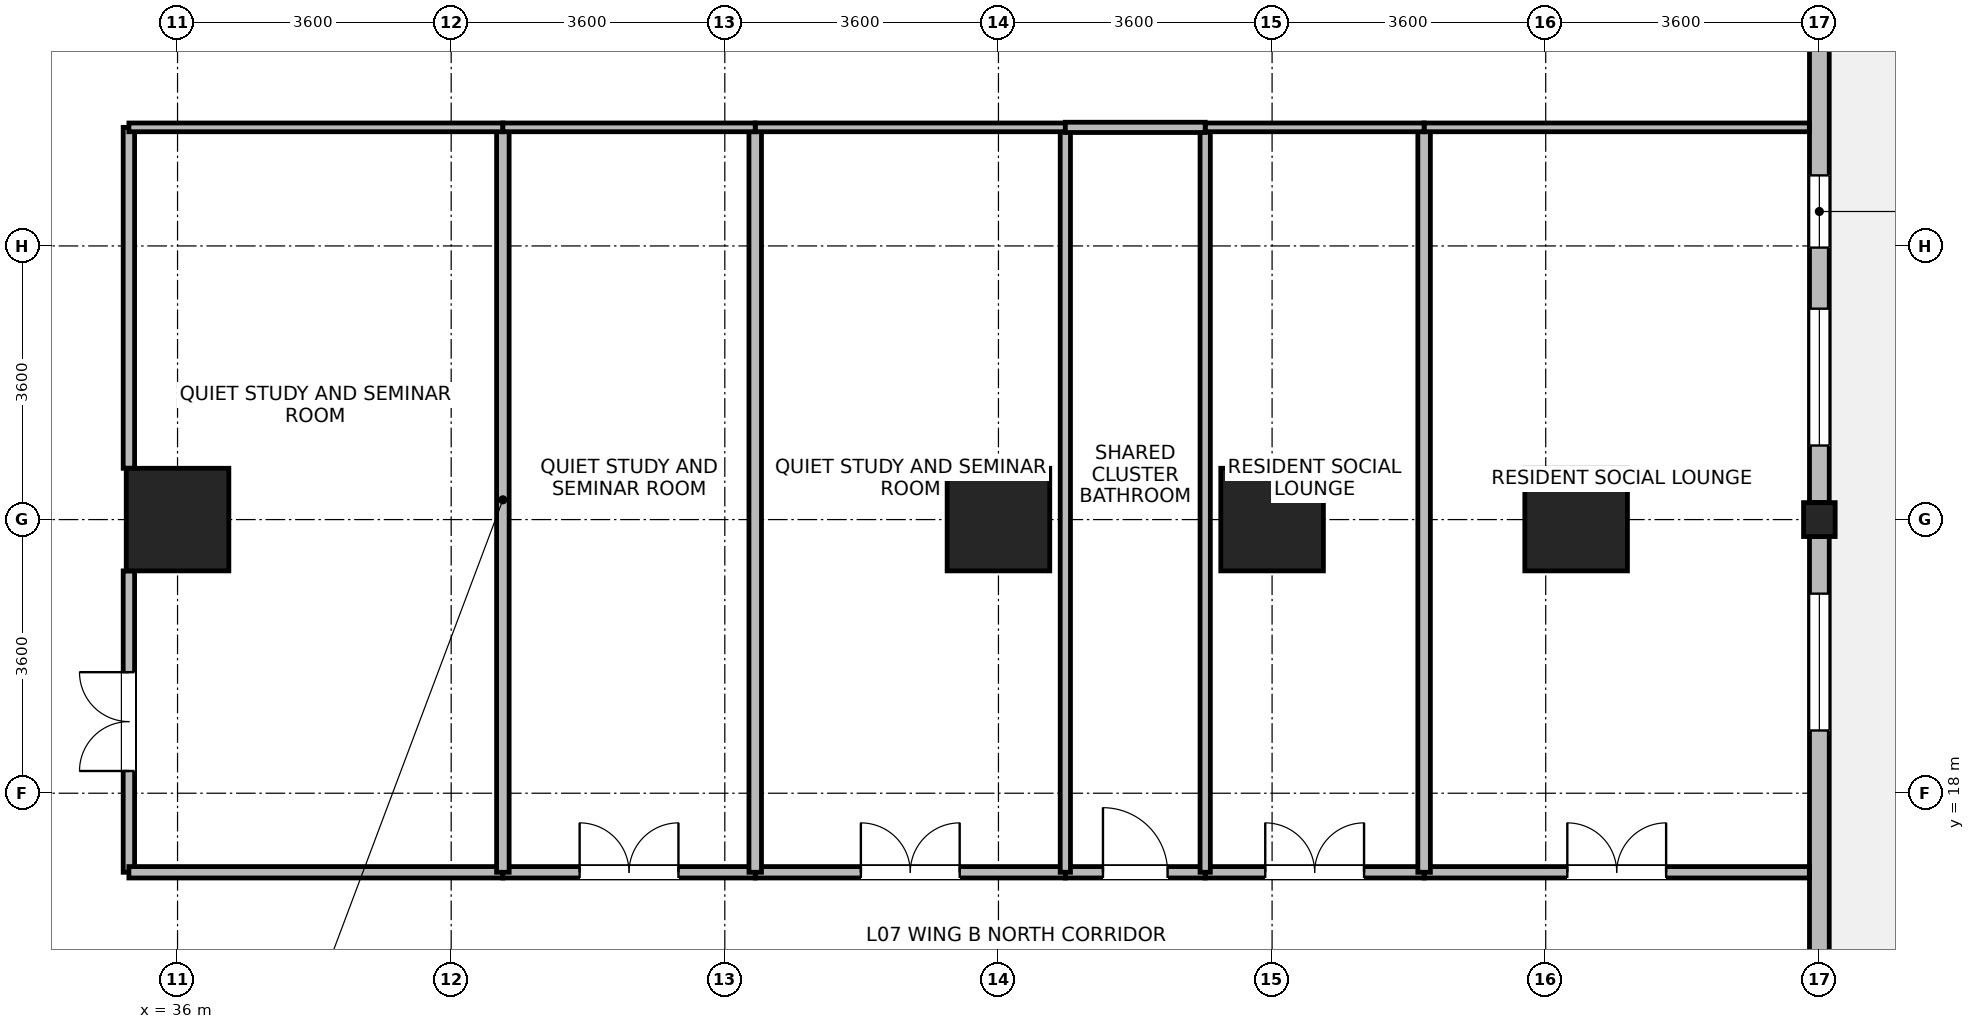
"""IFC4 building model, lengths in metres.
Left out: names, types, materials, properties, quantities, classifications, styles, units other than length and angle.
Written with IfcOpenShell. Run it as: python <this file> out.ifc"""

import sys

from ifc_helpers import new_model, si_unit, direction, frame, frame_2d, origin, origin_2d, place, context, subcontext, project, spatial, rectangle, i_section, extrude, source, transform, mapped, element, fill, save


model = new_model("IFC4")
c1 = context("Model", 3, precision=1e-05, world=origin(), true_north=direction((0.0, 1.0)))
c2 = subcontext(c1, "Body", "Model", "MODEL_VIEW")
j1 = project(units=[si_unit("LENGTHUNIT", "METRE"), si_unit("PLANEANGLEUNIT", "RADIAN")], contexts=[c1])
p1 = place(None, origin())
s1 = spatial("IfcSite", under=j1, at=p1, CompositionType="ELEMENT")
p2 = place(p1, origin())
s2 = spatial("IfcBuilding", under=s1, at=p2, CompositionType="ELEMENT")
p3 = place(p2, frame((0.0, 0.0, 32.7)))
s3 = spatial("IfcBuildingStorey", under=s2, at=p3, CompositionType="ELEMENT", Elevation=32.7)
m1 = source(origin(), c2, "Body", "SweptSolid", [
    extrude(rectangle(XDim=1.35, YDim=1.35, at=origin_2d()), origin(), (0.0, 0.0, 1.0), 3.7),
])
for number, where, z_axis, x_axis in (
    (1, (36.0, 21.6, 0.0), (0.0, 0.0, 1.0), (1.0, 0.0, 0.0)),
    (2, (46.8, 21.6, 0.0), (0.0, 0.0, 1.0), (1.0, 0.0, 0.0)),
    (3, (50.4, 21.6, 0.0), (0.0, 0.0, 1.0), (1.0, 0.0, 0.0)),
    (4, (54.4, 21.6, 0.0), (0.0, 0.0, 1.0), (1.0, 0.0, 0.0)),
):
    element("IfcColumn", number, at=place(p3, frame(where, z_axis=z_axis, x_axis=x_axis)), inside=s3, PredefinedType="COLUMN", context=c2, shape_type="MappedRepresentation", body=[
        mapped(m1, transform((0.0, 0.0, 0.0), x_axis=(1.0, 0.0, 0.0), y_axis=(0.0, 1.0, 0.0), z_axis=(0.0, 0.0, 1.0), scale=1.0)),
    ])
m2 = source(origin(), c2, "Body", "SweptSolid", [
    extrude(i_section(OverallWidth=0.416, OverallDepth=0.446, WebThickness=0.029, FlangeThickness=0.04, FilletRadius=0.015, at=origin_2d()), origin(), (0.0, 0.0, 1.0), 3.7),
])
p4 = place(p3, frame((57.6, 21.6, 0.0), z_axis=(0.0, 0.0, 1.0), x_axis=(1.0, 0.0, 0.0)))
e5 = element("IfcColumn", 5, at=p4, inside=s3, PredefinedType="COLUMN", context=c2, shape_type="MappedRepresentation", body=[
    mapped(m2, transform((0.0, 0.0, 0.0), x_axis=(1.0, 0.0, 0.0), y_axis=(0.0, 1.0, 0.0), z_axis=(0.0, 0.0, 1.0), scale=1.0)),
])
p5 = place(p3, frame((57.6, 21.376, 0.0), z_axis=(0.0, 0.0, 1.0), x_axis=(0.0, -1.0, 0.0)))
e6 = element("IfcWall", 6, at=p5, inside=s3, PredefinedType="STANDARD", context=c2, shape_type="SweptSolid", body=[
    extrude(rectangle(XDim=6.602, YDim=0.26, at=frame_2d((3.301, 0.0))), origin(), (0.0, 0.0, 1.0), 2.93),
])
p6 = place(p5, frame((0.75, 0.0, 0.85)))
e7 = element("IfcOpeningElement", 7, at=p6, cuts=e6, PredefinedType="OPENING", context=c2, shape_type="SweptSolid", body=[
    extrude(rectangle(XDim=1.8, YDim=1.85, at=frame_2d((0.9, 0.925))), frame((0.0, 0.14, 0.0), z_axis=(0.0, -1.0, 0.0), x_axis=(1.0, 0.0, 0.0)), (0.0, 0.0, 1.0), 0.28),
])
p7 = place(p3, frame((57.6, 28.426, 0.0), z_axis=(0.0, 0.0, 1.0), x_axis=(0.0, -1.0, 0.0)))
e8 = element("IfcWall", 8, at=p7, inside=s3, PredefinedType="STANDARD", context=c2, shape_type="SweptSolid", body=[
    extrude(rectangle(XDim=6.602, YDim=0.26, at=frame_2d((3.301, 0.0))), origin(), (0.0, 0.0, 1.0), 2.93),
])
p8 = place(p7, frame((4.052, 0.0, 0.85)))
e9 = element("IfcOpeningElement", 9, at=p8, cuts=e8, PredefinedType="OPENING", context=c2, shape_type="SweptSolid", body=[
    extrude(rectangle(XDim=1.8, YDim=1.85, at=frame_2d((0.9, 0.925))), frame((0.0, 0.14, 0.0), z_axis=(0.0, -1.0, 0.0), x_axis=(1.0, 0.0, 0.0)), (0.0, 0.0, 1.0), 0.28),
])
p9 = place(p7, frame((2.298, 0.0, 0.85)))
e10 = element("IfcOpeningElement", 10, at=p9, cuts=e8, PredefinedType="OPENING", context=c2, shape_type="SweptSolid", body=[
    extrude(rectangle(XDim=0.95, YDim=1.75, at=frame_2d((0.475, 0.875))), frame((0.0, 0.14, 0.0), z_axis=(0.0, -1.0, 0.0), x_axis=(1.0, 0.0, 0.0)), (0.0, 0.0, 1.0), 0.28),
])
p10 = place(p3, frame((35.36, 16.96, 0.0), z_axis=(0.0, 0.0, 1.0), x_axis=(0.0, 1.0, 0.0)))
e11 = element("IfcWall", 11, at=p10, inside=s3, PredefinedType="PARTITIONING", context=c2, shape_type="SweptSolid", body=[
    extrude(rectangle(XDim=3.965, YDim=0.15, at=frame_2d((1.982, 0.0))), origin(), (0.0, 0.0, 1.0), 3.43),
])
p11 = place(p10, frame((1.333, 0.0, 0.0)))
e12 = element("IfcOpeningElement", 12, at=p11, cuts=e11, PredefinedType="OPENING", context=c2, shape_type="SweptSolid", body=[
    extrude(rectangle(XDim=1.3, YDim=2.12, at=frame_2d((0.65, 1.06))), frame((0.0, 0.085, 0.0), z_axis=(0.0, -1.0, 0.0), x_axis=(1.0, 0.0, 0.0)), (0.0, 0.0, 1.0), 0.17),
])
p12 = place(p3, frame((35.36, 22.275, 0.0), z_axis=(0.0, 0.0, 1.0), x_axis=(0.0, 1.0, 0.0)))
e13 = element("IfcWall", 13, at=p12, inside=s3, PredefinedType="PARTITIONING", context=c2, shape_type="SweptSolid", body=[
    extrude(rectangle(XDim=4.485, YDim=0.15, at=frame_2d((2.243, 0.0))), origin(), (0.0, 0.0, 1.0), 3.43),
])
p13 = place(p3, frame((52.4, 16.96, 0.0), z_axis=(0.0, 0.0, 1.0), x_axis=(1.0, 0.0, 0.0)))
e14 = element("IfcWall", 14, at=p13, inside=s3, PredefinedType="PARTITIONING", context=c2, shape_type="SweptSolid", body=[
    extrude(rectangle(XDim=5.068, YDim=0.15, at=frame_2d((2.534, 0.0))), origin(), (0.0, 0.0, 1.0), 3.43),
])
p14 = place(p13, frame((1.884, 0.0, 0.0)))
e15 = element("IfcOpeningElement", 15, at=p14, cuts=e14, PredefinedType="OPENING", context=c2, shape_type="SweptSolid", body=[
    extrude(rectangle(XDim=1.3, YDim=2.12, at=frame_2d((0.65, 1.06))), frame((0.0, 0.085, 0.0), z_axis=(0.0, -1.0, 0.0), x_axis=(1.0, 0.0, 0.0)), (0.0, 0.0, 1.0), 0.17),
])
p15 = place(p3, frame((35.36, 16.96, 0.0), z_axis=(0.0, 0.0, 1.0), x_axis=(1.0, 0.0, 0.0)))
e16 = element("IfcWall", 16, at=p15, inside=s3, PredefinedType="PARTITIONING", context=c2, shape_type="SweptSolid", body=[
    extrude(rectangle(XDim=4.92, YDim=0.15, at=frame_2d((2.46, 0.0))), origin(), (0.0, 0.0, 1.0), 3.43),
])
p16 = place(p3, frame((43.6, 16.96, 0.0), z_axis=(0.0, 0.0, 1.0), x_axis=(1.0, 0.0, 0.0)))
e17 = element("IfcWall", 17, at=p16, inside=s3, PredefinedType="PARTITIONING", context=c2, shape_type="SweptSolid", body=[
    extrude(rectangle(XDim=4.08, YDim=0.15, at=frame_2d((2.04, 0.0))), origin(), (0.0, 0.0, 1.0), 3.43),
])
p17 = place(p16, frame((1.39, 0.0, 0.0)))
e18 = element("IfcOpeningElement", 18, at=p17, cuts=e17, PredefinedType="OPENING", context=c2, shape_type="SweptSolid", body=[
    extrude(rectangle(XDim=1.3, YDim=2.12, at=frame_2d((0.65, 1.06))), frame((0.0, 0.085, 0.0), z_axis=(0.0, -1.0, 0.0), x_axis=(1.0, 0.0, 0.0)), (0.0, 0.0, 1.0), 0.17),
])
p18 = place(p3, frame((40.28, 16.96, 0.0), z_axis=(0.0, 0.0, 1.0), x_axis=(1.0, 0.0, 0.0)))
e19 = element("IfcWall", 19, at=p18, inside=s3, PredefinedType="PARTITIONING", context=c2, shape_type="SweptSolid", body=[
    extrude(rectangle(XDim=3.32, YDim=0.15, at=frame_2d((1.66, 0.0))), origin(), (0.0, 0.0, 1.0), 3.43),
])
p19 = place(p18, frame((1.01, 0.0, 0.0)))
e20 = element("IfcOpeningElement", 20, at=p19, cuts=e19, PredefinedType="OPENING", context=c2, shape_type="SweptSolid", body=[
    extrude(rectangle(XDim=1.3, YDim=2.12, at=frame_2d((0.65, 1.06))), frame((0.0, 0.085, 0.0), z_axis=(0.0, -1.0, 0.0), x_axis=(1.0, 0.0, 0.0)), (0.0, 0.0, 1.0), 0.17),
])
p20 = place(p3, frame((49.52, 16.96, 0.0), z_axis=(0.0, 0.0, 1.0), x_axis=(1.0, 0.0, 0.0)))
e21 = element("IfcWall", 21, at=p20, inside=s3, PredefinedType="PARTITIONING", context=c2, shape_type="SweptSolid", body=[
    extrude(rectangle(XDim=2.88, YDim=0.15, at=frame_2d((1.44, 0.0))), origin(), (0.0, 0.0, 1.0), 3.43),
])
p21 = place(p20, frame((0.79, 0.0, 0.0)))
e22 = element("IfcOpeningElement", 22, at=p21, cuts=e21, PredefinedType="OPENING", context=c2, shape_type="SweptSolid", body=[
    extrude(rectangle(XDim=1.3, YDim=2.12, at=frame_2d((0.65, 1.06))), frame((0.0, 0.085, 0.0), z_axis=(0.0, -1.0, 0.0), x_axis=(1.0, 0.0, 0.0)), (0.0, 0.0, 1.0), 0.17),
])
p22 = place(p3, frame((47.68, 16.96, 0.0), z_axis=(0.0, 0.0, 1.0), x_axis=(1.0, 0.0, 0.0)))
e23 = element("IfcWall", 23, at=p22, inside=s3, PredefinedType="PARTITIONING", context=c2, shape_type="SweptSolid", body=[
    extrude(rectangle(XDim=1.84, YDim=0.15, at=frame_2d((0.92, 0.0))), origin(), (0.0, 0.0, 1.0), 3.43),
])
p23 = place(p22, frame((0.495, 0.0, 0.0)))
e24 = element("IfcOpeningElement", 24, at=p23, cuts=e23, PredefinedType="OPENING", context=c2, shape_type="SweptSolid", body=[
    extrude(rectangle(XDim=0.85, YDim=2.04, at=frame_2d((0.425, 1.02))), frame((0.0, 0.085, 0.0), z_axis=(0.0, -1.0, 0.0), x_axis=(1.0, 0.0, 0.0)), (0.0, 0.0, 1.0), 0.17),
])
for number, where, z_axis, x_axis in (
    (25, (40.28, 16.96, 0.0), (0.0, 0.0, 1.0), (0.0, 1.0, 0.0)),
    (26, (43.6, 16.96, 0.0), (0.0, 0.0, 1.0), (0.0, 1.0, 0.0)),
):
    element("IfcWall", number, at=place(p3, frame(where, z_axis=z_axis, x_axis=x_axis)), inside=s3, PredefinedType="PARTITIONING", context=c2, shape_type="SweptSolid", body=[
        extrude(rectangle(XDim=9.8, YDim=0.165, at=frame_2d((4.9, 0.0))), origin(), (0.0, 0.0, 1.0), 3.43),
    ])
for number, where, z_axis, x_axis in (
    (27, (47.68, 16.96, 0.0), (0.0, 0.0, 1.0), (0.0, 1.0, 0.0)),
    (28, (49.52, 16.96, 0.0), (0.0, 0.0, 1.0), (0.0, 1.0, 0.0)),
):
    element("IfcWall", number, at=place(p3, frame(where, z_axis=z_axis, x_axis=x_axis)), inside=s3, PredefinedType="PARTITIONING", context=c2, shape_type="SweptSolid", body=[
        extrude(rectangle(XDim=9.8, YDim=0.135, at=frame_2d((4.9, 0.0))), origin(), (0.0, 0.0, 1.0), 3.43),
    ])
p24 = place(p3, frame((52.4, 16.96, 0.0), z_axis=(0.0, 0.0, 1.0), x_axis=(0.0, 1.0, 0.0)))
e29 = element("IfcWall", 29, at=p24, inside=s3, PredefinedType="PARTITIONING", context=c2, shape_type="SweptSolid", body=[
    extrude(rectangle(XDim=9.8, YDim=0.165, at=frame_2d((4.9, 0.0))), origin(), (0.0, 0.0, 1.0), 3.43),
])
p25 = place(p3, frame((52.4, 26.76, 0.0), z_axis=(0.0, 0.0, 1.0), x_axis=(1.0, 0.0, 0.0)))
e30 = element("IfcWall", 30, at=p25, inside=s3, PredefinedType="PARTITIONING", context=c2, shape_type="SweptSolid", body=[
    extrude(rectangle(XDim=5.068, YDim=0.115, at=frame_2d((2.534, 0.0))), origin(), (0.0, 0.0, 1.0), 3.43),
])
p26 = place(p3, frame((35.36, 26.76, 0.0), z_axis=(0.0, 0.0, 1.0), x_axis=(1.0, 0.0, 0.0)))
e31 = element("IfcWall", 31, at=p26, inside=s3, PredefinedType="PARTITIONING", context=c2, shape_type="SweptSolid", body=[
    extrude(rectangle(XDim=4.92, YDim=0.115, at=frame_2d((2.46, 0.0))), origin(), (0.0, 0.0, 1.0), 3.43),
])
p27 = place(p3, frame((43.6, 26.76, 0.0), z_axis=(0.0, 0.0, 1.0), x_axis=(1.0, 0.0, 0.0)))
e32 = element("IfcWall", 32, at=p27, inside=s3, PredefinedType="PARTITIONING", context=c2, shape_type="SweptSolid", body=[
    extrude(rectangle(XDim=4.08, YDim=0.115, at=frame_2d((2.04, 0.0))), origin(), (0.0, 0.0, 1.0), 3.43),
])
p28 = place(p3, frame((40.28, 26.76, 0.0), z_axis=(0.0, 0.0, 1.0), x_axis=(1.0, 0.0, 0.0)))
e33 = element("IfcWall", 33, at=p28, inside=s3, PredefinedType="PARTITIONING", context=c2, shape_type="SweptSolid", body=[
    extrude(rectangle(XDim=3.32, YDim=0.115, at=frame_2d((1.66, 0.0))), origin(), (0.0, 0.0, 1.0), 3.43),
])
p29 = place(p3, frame((49.52, 26.76, 0.0), z_axis=(0.0, 0.0, 1.0), x_axis=(1.0, 0.0, 0.0)))
e34 = element("IfcWall", 34, at=p29, inside=s3, PredefinedType="PARTITIONING", context=c2, shape_type="SweptSolid", body=[
    extrude(rectangle(XDim=2.88, YDim=0.115, at=frame_2d((1.44, 0.0))), origin(), (0.0, 0.0, 1.0), 3.43),
])
p30 = place(p3, frame((47.68, 26.76, 0.0), z_axis=(0.0, 0.0, 1.0), x_axis=(1.0, 0.0, 0.0)))
e35 = element("IfcWall", 35, at=p30, inside=s3, PredefinedType="PARTITIONING", context=c2, shape_type="SweptSolid", body=[
    extrude(rectangle(XDim=1.84, YDim=0.135, at=frame_2d((0.92, 0.0))), origin(), (0.0, 0.0, 1.0), 3.43),
])
p31 = place(p6, origin())
e36 = element("IfcWindow", 36, at=p31, inside=s3, PartitioningType="SINGLE_PANEL", PredefinedType="WINDOW", context=c2, shape_type="SweptSolid", body=[
    extrude(rectangle(XDim=1.8, YDim=1.85, at=frame_2d((0.9, 0.925))), frame((0.0, 0.03, 0.0), z_axis=(0.0, -1.0, 0.0), x_axis=(1.0, 0.0, 0.0)), (0.0, 0.0, 1.0), 0.06),
])
fill(e7, e36)
p32 = place(p8, origin())
e37 = element("IfcWindow", 37, at=p32, inside=s3, PartitioningType="SINGLE_PANEL", PredefinedType="WINDOW", context=c2, shape_type="SweptSolid", body=[
    extrude(rectangle(XDim=1.8, YDim=1.85, at=frame_2d((0.9, 0.925))), frame((0.0, 0.03, 0.0), z_axis=(0.0, -1.0, 0.0), x_axis=(1.0, 0.0, 0.0)), (0.0, 0.0, 1.0), 0.06),
])
fill(e9, e37)
p33 = place(p9, origin())
e38 = element("IfcWindow", 38, at=p33, inside=s3, PartitioningType="SINGLE_PANEL", PredefinedType="WINDOW", context=c2, shape_type="SweptSolid", body=[
    extrude(rectangle(XDim=0.95, YDim=1.75, at=frame_2d((0.475, 0.875))), frame((0.0, 0.03, 0.0), z_axis=(0.0, -1.0, 0.0), x_axis=(1.0, 0.0, 0.0)), (0.0, 0.0, 1.0), 0.06),
])
fill(e10, e38)
p34 = place(p11, origin())
e39 = element("IfcDoor", 39, at=p34, inside=s3, OperationType="DOUBLE_DOOR_SINGLE_SWING", PredefinedType="DOOR", context=c2, shape_type="SweptSolid", body=[
    extrude(rectangle(XDim=1.3, YDim=2.12, at=frame_2d((0.65, 1.06))), frame((0.0, 0.025, 0.0), z_axis=(0.0, -1.0, 0.0), x_axis=(1.0, 0.0, 0.0)), (0.0, 0.0, 1.0), 0.05),
])
fill(e12, e39)
p35 = place(p14, origin())
e40 = element("IfcDoor", 40, at=p35, inside=s3, OperationType="DOUBLE_DOOR_SINGLE_SWING", PredefinedType="DOOR", context=c2, shape_type="SweptSolid", body=[
    extrude(rectangle(XDim=1.3, YDim=2.12, at=frame_2d((0.65, 1.06))), frame((0.0, 0.025, 0.0), z_axis=(0.0, -1.0, 0.0), x_axis=(1.0, 0.0, 0.0)), (0.0, 0.0, 1.0), 0.05),
])
fill(e15, e40)
p36 = place(p17, origin())
e41 = element("IfcDoor", 41, at=p36, inside=s3, OperationType="DOUBLE_DOOR_SINGLE_SWING", PredefinedType="DOOR", context=c2, shape_type="SweptSolid", body=[
    extrude(rectangle(XDim=1.3, YDim=2.12, at=frame_2d((0.65, 1.06))), frame((0.0, 0.025, 0.0), z_axis=(0.0, -1.0, 0.0), x_axis=(1.0, 0.0, 0.0)), (0.0, 0.0, 1.0), 0.05),
])
fill(e18, e41)
p37 = place(p19, origin())
e42 = element("IfcDoor", 42, at=p37, inside=s3, OperationType="DOUBLE_DOOR_SINGLE_SWING", PredefinedType="DOOR", context=c2, shape_type="SweptSolid", body=[
    extrude(rectangle(XDim=1.3, YDim=2.12, at=frame_2d((0.65, 1.06))), frame((0.0, 0.025, 0.0), z_axis=(0.0, -1.0, 0.0), x_axis=(1.0, 0.0, 0.0)), (0.0, 0.0, 1.0), 0.05),
])
fill(e20, e42)
p38 = place(p21, origin())
e43 = element("IfcDoor", 43, at=p38, inside=s3, OperationType="DOUBLE_DOOR_SINGLE_SWING", PredefinedType="DOOR", context=c2, shape_type="SweptSolid", body=[
    extrude(rectangle(XDim=1.3, YDim=2.12, at=frame_2d((0.65, 1.06))), frame((0.0, 0.025, 0.0), z_axis=(0.0, -1.0, 0.0), x_axis=(1.0, 0.0, 0.0)), (0.0, 0.0, 1.0), 0.05),
])
fill(e22, e43)
p39 = place(p23, origin())
e44 = element("IfcDoor", 44, at=p39, inside=s3, OperationType="SINGLE_SWING_LEFT", PredefinedType="DOOR", context=c2, shape_type="SweptSolid", body=[
    extrude(rectangle(XDim=0.85, YDim=2.04, at=frame_2d((0.425, 1.02))), frame((0.0, 0.025, 0.0), z_axis=(0.0, -1.0, 0.0), x_axis=(1.0, 0.0, 0.0)), (0.0, 0.0, 1.0), 0.05),
])
fill(e24, e44)
save(model, sys.argv[1])
